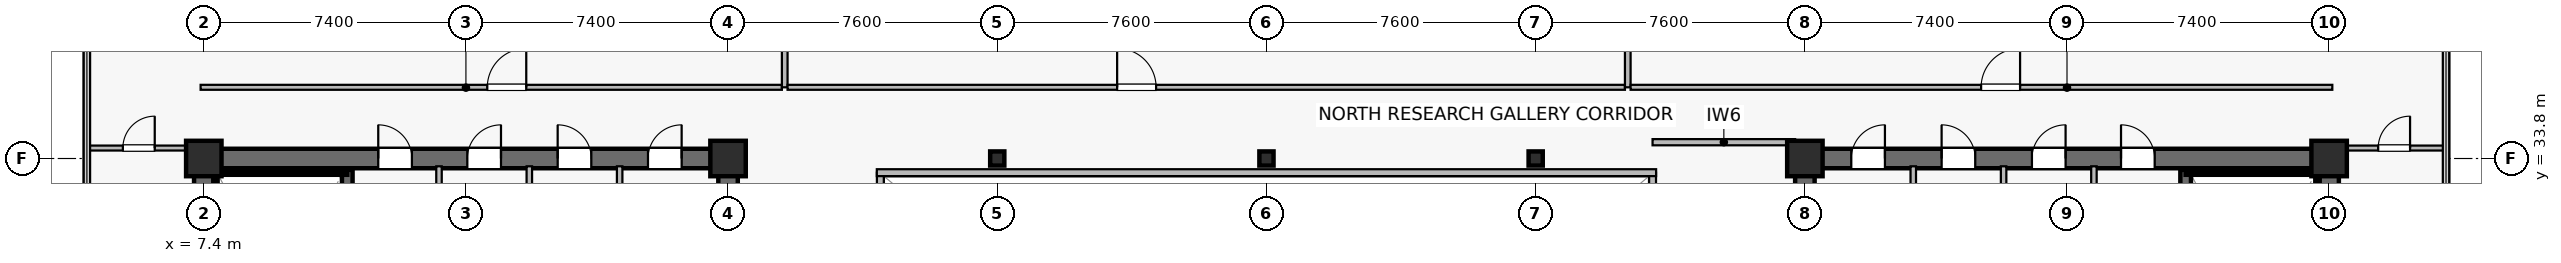
"""IFC4 building model, lengths in metres.
Left out: names, types, materials, properties, quantities, classifications, styles, units other than length and angle.
Written with IfcOpenShell. Run it as: python <this file> out.ifc"""

import sys

from ifc_helpers import new_model, si_unit, direction, frame, frame_2d, origin, origin_2d, place, context, subcontext, project, spatial, rectangle, hollow_rectangle, extrude, source, transform, mapped, element, fill, save


model = new_model("IFC4")
c1 = context("Model", 3, precision=1e-05, world=origin(), true_north=direction((0.0, 1.0)))
c2 = subcontext(c1, "Body", "Model", "MODEL_VIEW")
j1 = project(units=[si_unit("LENGTHUNIT", "METRE"), si_unit("PLANEANGLEUNIT", "RADIAN")], contexts=[c1])
p1 = place(None, origin())
s1 = spatial("IfcSite", under=j1, at=p1, CompositionType="ELEMENT")
p2 = place(p1, origin())
s2 = spatial("IfcBuilding", under=s1, at=p2, CompositionType="ELEMENT")
p3 = place(p2, frame((0.0, 0.0, 209.6)))
s3 = spatial("IfcBuildingStorey", under=s2, at=p3, CompositionType="ELEMENT", Elevation=209.6)
p4 = place(p3, frame((7.125, 33.8, 0.0), z_axis=(0.0, 0.0, 1.0), x_axis=(1.0, 0.0, 0.0)))
e1 = element("IfcWall", 1, at=p4, inside=s3, PredefinedType="SHEAR", context=c2, shape_type="SweptSolid", body=[
    extrude(rectangle(XDim=15.35, YDim=0.55, at=frame_2d((7.675, 0.0))), origin(), (0.0, 0.0, 1.0), 3.8),
])
p5 = place(p4, frame((5.2, 0.0, 0.0)))
e2 = element("IfcOpeningElement", 2, at=p5, cuts=e1, PredefinedType="OPENING", context=c2, shape_type="SweptSolid", body=[
    extrude(rectangle(XDim=0.95, YDim=2.15, at=frame_2d((0.475, 1.075))), frame((0.0, 0.285, 0.0), z_axis=(0.0, -1.0, 0.0), x_axis=(1.0, 0.0, 0.0)), (0.0, 0.0, 1.0), 0.57),
])
p6 = place(p4, frame((7.715, 0.0, 0.0)))
e3 = element("IfcOpeningElement", 3, at=p6, cuts=e1, PredefinedType="OPENING", context=c2, shape_type="SweptSolid", body=[
    extrude(rectangle(XDim=0.95, YDim=2.15, at=frame_2d((0.475, 1.075))), frame((0.0, 0.285, 0.0), z_axis=(0.0, -1.0, 0.0), x_axis=(1.0, 0.0, 0.0)), (0.0, 0.0, 1.0), 0.57),
])
p7 = place(p4, frame((10.265, 0.0, 0.0)))
e4 = element("IfcOpeningElement", 4, at=p7, cuts=e1, PredefinedType="OPENING", context=c2, shape_type="SweptSolid", body=[
    extrude(rectangle(XDim=0.95, YDim=2.15, at=frame_2d((0.475, 1.075))), frame((0.0, 0.285, 0.0), z_axis=(0.0, -1.0, 0.0), x_axis=(1.0, 0.0, 0.0)), (0.0, 0.0, 1.0), 0.57),
])
p8 = place(p4, frame((12.815, 0.0, 0.0)))
e5 = element("IfcOpeningElement", 5, at=p8, cuts=e1, PredefinedType="OPENING", context=c2, shape_type="SweptSolid", body=[
    extrude(rectangle(XDim=0.95, YDim=2.15, at=frame_2d((0.475, 1.075))), frame((0.0, 0.285, 0.0), z_axis=(0.0, -1.0, 0.0), x_axis=(1.0, 0.0, 0.0)), (0.0, 0.0, 1.0), 0.57),
])
p9 = place(p3, frame((7.4, 15.075, 0.0), z_axis=(0.0, 0.0, 1.0), x_axis=(0.0, 1.0, 0.0)))
e6 = element("IfcWall", 6, at=p9, inside=s3, PredefinedType="SHEAR", context=c2, shape_type="SweptSolid", body=[
    extrude(rectangle(XDim=18.45, YDim=0.55, at=frame_2d((9.225, 0.0))), origin(), (0.0, 0.0, 1.0), 3.8),
])
p10 = place(p3, frame((22.2, 15.075, 0.0), z_axis=(0.0, 0.0, 1.0), x_axis=(0.0, 1.0, 0.0)))
e7 = element("IfcWall", 7, at=p10, inside=s3, PredefinedType="SHEAR", context=c2, shape_type="SweptSolid", body=[
    extrude(rectangle(XDim=18.45, YDim=0.55, at=frame_2d((9.225, 0.0))), origin(), (0.0, 0.0, 1.0), 3.8),
])
p11 = place(p10, frame((3.475, 0.0, 0.0)))
e8 = element("IfcOpeningElement", 8, at=p11, cuts=e7, PredefinedType="OPENING", context=c2, shape_type="SweptSolid", body=[
    extrude(rectangle(XDim=1.42, YDim=2.2, at=frame_2d((0.71, 1.1))), frame((0.0, 0.285, 0.0), z_axis=(0.0, -1.0, 0.0), x_axis=(1.0, 0.0, 0.0)), (0.0, 0.0, 1.0), 0.57),
])
p12 = place(p3, frame((11.45, 24.85, 0.0), z_axis=(0.0, 0.0, 1.0), x_axis=(0.0, 1.0, 0.0)))
e9 = element("IfcWall", 9, at=p12, inside=s3, PredefinedType="SHEAR", context=c2, shape_type="SweptSolid", body=[
    extrude(rectangle(XDim=8.63, YDim=0.3, at=frame_2d((4.315, 0.0))), origin(), (0.0, 0.0, 1.0), 3.8),
])
p13 = place(p12, frame((0.42, 0.0, 0.0)))
e10 = element("IfcOpeningElement", 10, at=p13, cuts=e9, PredefinedType="OPENING", context=c2, shape_type="SweptSolid", body=[
    extrude(rectangle(XDim=1.1, YDim=2.15, at=frame_2d((0.55, 1.075))), frame((0.0, 0.16, 0.0), z_axis=(0.0, -1.0, 0.0), x_axis=(1.0, 0.0, 0.0)), (0.0, 0.0, 1.0), 0.32),
])
p14 = place(p3, frame((7.73, 33.4, 0.0), z_axis=(0.0, 0.0, 1.0), x_axis=(1.0, 0.0, 0.0)))
e11 = element("IfcWall", 11, at=p14, inside=s3, PredefinedType="SOLIDWALL", context=c2, shape_type="SweptSolid", body=[
    extrude(rectangle(XDim=3.72, YDim=0.12, at=frame_2d((1.86, 0.0))), origin(), (0.0, 0.0, 1.0), 3.8),
])
p15 = place(p3, frame((7.73, 25.0, 0.0), z_axis=(0.0, 0.0, 1.0), x_axis=(0.0, 1.0, 0.0)))
e12 = element("IfcWall", 12, at=p15, inside=s3, PredefinedType="SOLIDWALL", context=c2, shape_type="SweptSolid", body=[
    extrude(rectangle(XDim=8.32, YDim=0.12, at=frame_2d((4.16, 0.0))), origin(), (0.0, 0.0, 1.0), 3.8),
])
p16 = place(p3, frame((52.325, 33.8, 0.0), z_axis=(0.0, 0.0, 1.0), x_axis=(1.0, 0.0, 0.0)))
e13 = element("IfcWall", 13, at=p16, inside=s3, PredefinedType="SHEAR", context=c2, shape_type="SweptSolid", body=[
    extrude(rectangle(XDim=15.35, YDim=0.55, at=frame_2d((7.675, 0.0))), origin(), (0.0, 0.0, 1.0), 3.8),
])
p17 = place(p16, frame((9.2, 0.0, 0.0)))
e14 = element("IfcOpeningElement", 14, at=p17, cuts=e13, PredefinedType="OPENING", context=c2, shape_type="SweptSolid", body=[
    extrude(rectangle(XDim=0.95, YDim=2.15, at=frame_2d((0.475, 1.075))), frame((0.0, 0.285, 0.0), z_axis=(0.0, -1.0, 0.0), x_axis=(1.0, 0.0, 0.0)), (0.0, 0.0, 1.0), 0.57),
])
p18 = place(p16, frame((6.685, 0.0, 0.0)))
e15 = element("IfcOpeningElement", 15, at=p18, cuts=e13, PredefinedType="OPENING", context=c2, shape_type="SweptSolid", body=[
    extrude(rectangle(XDim=0.95, YDim=2.15, at=frame_2d((0.475, 1.075))), frame((0.0, 0.285, 0.0), z_axis=(0.0, -1.0, 0.0), x_axis=(1.0, 0.0, 0.0)), (0.0, 0.0, 1.0), 0.57),
])
p19 = place(p16, frame((4.135, 0.0, 0.0)))
e16 = element("IfcOpeningElement", 16, at=p19, cuts=e13, PredefinedType="OPENING", context=c2, shape_type="SweptSolid", body=[
    extrude(rectangle(XDim=0.95, YDim=2.15, at=frame_2d((0.475, 1.075))), frame((0.0, 0.285, 0.0), z_axis=(0.0, -1.0, 0.0), x_axis=(1.0, 0.0, 0.0)), (0.0, 0.0, 1.0), 0.57),
])
p20 = place(p16, frame((1.585, 0.0, 0.0)))
e17 = element("IfcOpeningElement", 17, at=p20, cuts=e13, PredefinedType="OPENING", context=c2, shape_type="SweptSolid", body=[
    extrude(rectangle(XDim=0.95, YDim=2.15, at=frame_2d((0.475, 1.075))), frame((0.0, 0.285, 0.0), z_axis=(0.0, -1.0, 0.0), x_axis=(1.0, 0.0, 0.0)), (0.0, 0.0, 1.0), 0.57),
])
p21 = place(p3, frame((52.6, 15.075, 0.0), z_axis=(0.0, 0.0, 1.0), x_axis=(0.0, 1.0, 0.0)))
e18 = element("IfcWall", 18, at=p21, inside=s3, PredefinedType="SHEAR", context=c2, shape_type="SweptSolid", body=[
    extrude(rectangle(XDim=18.45, YDim=0.55, at=frame_2d((9.225, 0.0))), origin(), (0.0, 0.0, 1.0), 3.8),
])
p22 = place(p21, frame((3.475, 0.0, 0.0)))
e19 = element("IfcOpeningElement", 19, at=p22, cuts=e18, PredefinedType="OPENING", context=c2, shape_type="SweptSolid", body=[
    extrude(rectangle(XDim=1.42, YDim=2.2, at=frame_2d((0.71, 1.1))), frame((0.0, 0.285, 0.0), z_axis=(0.0, -1.0, 0.0), x_axis=(1.0, 0.0, 0.0)), (0.0, 0.0, 1.0), 0.57),
])
p23 = place(p3, frame((67.4, 15.075, 0.0), z_axis=(0.0, 0.0, 1.0), x_axis=(0.0, 1.0, 0.0)))
e20 = element("IfcWall", 20, at=p23, inside=s3, PredefinedType="SHEAR", context=c2, shape_type="SweptSolid", body=[
    extrude(rectangle(XDim=18.45, YDim=0.55, at=frame_2d((9.225, 0.0))), origin(), (0.0, 0.0, 1.0), 3.8),
])
p24 = place(p3, frame((63.35, 24.85, 0.0), z_axis=(0.0, 0.0, 1.0), x_axis=(0.0, 1.0, 0.0)))
e21 = element("IfcWall", 21, at=p24, inside=s3, PredefinedType="SHEAR", context=c2, shape_type="SweptSolid", body=[
    extrude(rectangle(XDim=8.63, YDim=0.3, at=frame_2d((4.315, 0.0))), origin(), (0.0, 0.0, 1.0), 3.8),
])
p25 = place(p24, frame((0.42, 0.0, 0.0)))
e22 = element("IfcOpeningElement", 22, at=p25, cuts=e21, PredefinedType="OPENING", context=c2, shape_type="SweptSolid", body=[
    extrude(rectangle(XDim=1.1, YDim=2.15, at=frame_2d((0.55, 1.075))), frame((0.0, 0.16, 0.0), z_axis=(0.0, -1.0, 0.0), x_axis=(1.0, 0.0, 0.0)), (0.0, 0.0, 1.0), 0.32),
])
p26 = place(p3, frame((63.35, 33.4, 0.0), z_axis=(0.0, 0.0, 1.0), x_axis=(1.0, 0.0, 0.0)))
e23 = element("IfcWall", 23, at=p26, inside=s3, PredefinedType="SOLIDWALL", context=c2, shape_type="SweptSolid", body=[
    extrude(rectangle(XDim=3.72, YDim=0.12, at=frame_2d((1.86, 0.0))), origin(), (0.0, 0.0, 1.0), 3.8),
])
p27 = place(p3, frame((67.07, 25.0, 0.0), z_axis=(0.0, 0.0, 1.0), x_axis=(0.0, 1.0, 0.0)))
e24 = element("IfcWall", 24, at=p27, inside=s3, PredefinedType="SOLIDWALL", context=c2, shape_type="SweptSolid", body=[
    extrude(rectangle(XDim=8.32, YDim=0.12, at=frame_2d((4.16, 0.0))), origin(), (0.0, 0.0, 1.0), 3.8),
])
m1 = source(origin(), c2, "Body", "SweptSolid", [
    extrude(rectangle(XDim=1.0, YDim=1.0, at=origin_2d()), origin(), (0.0, 0.0, 1.0), 4.1),
])
for number, where, z_axis, x_axis in (
    (25, (7.4, 33.8, 0.0), (0.0, 0.0, 1.0), (1.0, 0.0, 0.0)),
    (26, (22.2, 33.8, 0.0), (0.0, 0.0, 1.0), (1.0, 0.0, 0.0)),
    (27, (52.6, 33.8, 0.0), (0.0, 0.0, 1.0), (1.0, 0.0, 0.0)),
    (28, (67.4, 33.8, 0.0), (0.0, 0.0, 1.0), (1.0, 0.0, 0.0)),
):
    element("IfcColumn", number, at=place(p3, frame(where, z_axis=z_axis, x_axis=x_axis)), inside=s3, PredefinedType="COLUMN", context=c2, shape_type="MappedRepresentation", body=[
        mapped(m1, transform((0.0, 0.0, 0.0), scale=1.0)),
    ])
m2 = source(origin(), c2, "Body", "SweptSolid", [
    extrude(hollow_rectangle(XDim=0.4, YDim=0.4, WallThickness=0.019, at=origin_2d()), origin(), (0.0, 0.0, 1.0), 4.1),
])
for number, where, z_axis, x_axis in (
    (29, (29.8, 33.8, 0.0), (0.0, 0.0, 1.0), (1.0, 0.0, 0.0)),
    (30, (37.4, 33.8, 0.0), (0.0, 0.0, 1.0), (1.0, 0.0, 0.0)),
    (31, (45.0, 33.8, 0.0), (0.0, 0.0, 1.0), (1.0, 0.0, 0.0)),
):
    element("IfcColumn", number, at=place(p3, frame(where, z_axis=z_axis, x_axis=x_axis)), inside=s3, PredefinedType="COLUMN", context=c2, shape_type="MappedRepresentation", body=[
        mapped(m2, transform((0.0, 0.0, 0.0), scale=1.0)),
    ])
for number, where, z_axis, x_axis in (
    (32, (14.04, 29.65, 0.0), (0.0, 0.0, 1.0), (0.0, 1.0, 0.0)),
    (33, (16.59, 29.65, 0.0), (0.0, 0.0, 1.0), (0.0, 1.0, 0.0)),
    (34, (19.14, 29.65, 0.0), (0.0, 0.0, 1.0), (0.0, 1.0, 0.0)),
    (35, (60.76, 29.65, 0.0), (0.0, 0.0, 1.0), (0.0, 1.0, 0.0)),
    (36, (58.21, 29.65, 0.0), (0.0, 0.0, 1.0), (0.0, 1.0, 0.0)),
    (37, (55.66, 29.65, 0.0), (0.0, 0.0, 1.0), (0.0, 1.0, 0.0)),
):
    element("IfcWall", number, at=place(p3, frame(where, z_axis=z_axis, x_axis=x_axis)), inside=s3, PredefinedType="PLUMBINGWALL", context=c2, shape_type="SweptSolid", body=[
        extrude(rectangle(XDim=3.93, YDim=0.155, at=frame_2d((1.965, 0.0))), origin(), (0.0, 0.0, 1.0), 3.8),
    ])
p28 = place(p3, frame((48.3, 34.26, 0.0), z_axis=(0.0, 0.0, 1.0), x_axis=(1.0, 0.0, 0.0)))
e38 = element("IfcWall", 38, at=p28, inside=s3, PredefinedType="PARTITIONING", context=c2, shape_type="SweptSolid", body=[
    extrude(rectangle(XDim=4.025, YDim=0.175, at=frame_2d((2.012, 0.0))), origin(), (0.0, 0.0, 1.0), 3.485),
])
p29 = place(p3, frame((26.5, 15.2, 0.0), z_axis=(0.0, 0.0, 1.0), x_axis=(0.0, 1.0, 0.0)))
e39 = element("IfcWall", 39, at=p29, inside=s3, PredefinedType="SOLIDWALL", context=c2, shape_type="SweptSolid", body=[
    extrude(rectangle(XDim=18.2, YDim=0.195, at=frame_2d((9.1, 0.0))), origin(), (0.0, 0.0, 1.0), 3.8),
])
p30 = place(p29, frame((1.8, 0.0, 0.9)))
e40 = element("IfcOpeningElement", 40, at=p30, cuts=e39, PredefinedType="OPENING", context=c2, shape_type="SweptSolid", body=[
    extrude(rectangle(XDim=1.5, YDim=1.4, at=frame_2d((0.75, 0.7))), frame((0.0, 0.107, 0.0), z_axis=(0.0, -1.0, 0.0), x_axis=(1.0, 0.0, 0.0)), (0.0, 0.0, 1.0), 0.215),
])
p31 = place(p29, frame((13.2, 0.0, 0.9)))
e41 = element("IfcOpeningElement", 41, at=p31, cuts=e39, PredefinedType="OPENING", context=c2, shape_type="SweptSolid", body=[
    extrude(rectangle(XDim=1.5, YDim=1.4, at=frame_2d((0.75, 0.7))), frame((0.0, 0.107, 0.0), z_axis=(0.0, -1.0, 0.0), x_axis=(1.0, 0.0, 0.0)), (0.0, 0.0, 1.0), 0.215),
])
p32 = place(p3, frame((48.3, 15.2, 0.0), z_axis=(0.0, 0.0, 1.0), x_axis=(0.0, 1.0, 0.0)))
e42 = element("IfcWall", 42, at=p32, inside=s3, PredefinedType="SOLIDWALL", context=c2, shape_type="SweptSolid", body=[
    extrude(rectangle(XDim=18.2, YDim=0.195, at=frame_2d((9.1, 0.0))), origin(), (0.0, 0.0, 1.0), 3.8),
])
p33 = place(p32, frame((1.8, 0.0, 0.9)))
e43 = element("IfcOpeningElement", 43, at=p33, cuts=e42, PredefinedType="OPENING", context=c2, shape_type="SweptSolid", body=[
    extrude(rectangle(XDim=1.5, YDim=1.4, at=frame_2d((0.75, 0.7))), frame((0.0, 0.107, 0.0), z_axis=(0.0, -1.0, 0.0), x_axis=(1.0, 0.0, 0.0)), (0.0, 0.0, 1.0), 0.215),
])
p34 = place(p32, frame((13.2, 0.0, 0.9)))
e44 = element("IfcOpeningElement", 44, at=p34, cuts=e42, PredefinedType="OPENING", context=c2, shape_type="SweptSolid", body=[
    extrude(rectangle(XDim=1.5, YDim=1.4, at=frame_2d((0.75, 0.7))), frame((0.0, 0.107, 0.0), z_axis=(0.0, -1.0, 0.0), x_axis=(1.0, 0.0, 0.0)), (0.0, 0.0, 1.0), 0.215),
])
p35 = place(p3, frame((26.4, 33.4, 0.0), z_axis=(0.0, 0.0, 1.0), x_axis=(1.0, 0.0, 0.0)))
e45 = element("IfcWall", 45, at=p35, inside=s3, PredefinedType="SOLIDWALL", context=c2, shape_type="SweptSolid", body=[
    extrude(rectangle(XDim=22.0, YDim=0.195, at=frame_2d((11.0, 0.0))), origin(), (0.0, 0.0, 1.0), 3.8),
])
p36 = place(p3, frame((7.31, 35.81, 0.0), z_axis=(0.0, 0.0, 1.0), x_axis=(1.0, 0.0, 0.0)))
e46 = element("IfcWall", 46, at=p36, inside=s3, PredefinedType="PARTITIONING", context=c2, shape_type="SweptSolid", body=[
    extrude(rectangle(XDim=16.41, YDim=0.14, at=frame_2d((8.205, 0.0))), origin(), (0.0, 0.0, 1.0), 3.197),
])
p37 = place(p36, frame((8.093, 0.0, 0.0)))
e47 = element("IfcOpeningElement", 47, at=p37, cuts=e46, PredefinedType="OPENING", context=c2, shape_type="SweptSolid", body=[
    extrude(rectangle(XDim=1.1, YDim=2.18, at=frame_2d((0.55, 1.09))), frame((0.0, 0.08, 0.0), z_axis=(0.0, -1.0, 0.0), x_axis=(1.0, 0.0, 0.0)), (0.0, 0.0, 1.0), 0.16),
])
p38 = place(p3, frame((23.8, 35.81, 0.0), z_axis=(0.0, 0.0, 1.0), x_axis=(0.0, 1.0, 0.0)))
e48 = element("IfcWall", 48, at=p38, inside=s3, PredefinedType="PARTITIONING", context=c2, shape_type="SweptSolid", body=[
    extrude(rectangle(XDim=10.08, YDim=0.16, at=frame_2d((5.04, 0.0))), origin(), (0.0, 0.0, 1.0), 3.135),
])
p39 = place(p3, frame((23.88, 35.81, 0.0), z_axis=(0.0, 0.0, 1.0), x_axis=(1.0, 0.0, 0.0)))
e49 = element("IfcWall", 49, at=p39, inside=s3, PredefinedType="PARTITIONING", context=c2, shape_type="SweptSolid", body=[
    extrude(rectangle(XDim=23.64, YDim=0.14, at=frame_2d((11.82, 0.0))), origin(), (0.0, 0.0, 1.0), 3.197),
])
p40 = place(p39, frame((9.304, 0.0, 0.0)))
e50 = element("IfcOpeningElement", 50, at=p40, cuts=e49, PredefinedType="OPENING", context=c2, shape_type="SweptSolid", body=[
    extrude(rectangle(XDim=1.1, YDim=2.18, at=frame_2d((0.55, 1.09))), frame((0.0, 0.08, 0.0), z_axis=(0.0, -1.0, 0.0), x_axis=(1.0, 0.0, 0.0)), (0.0, 0.0, 1.0), 0.16),
])
p41 = place(p3, frame((47.6, 35.81, 0.0), z_axis=(0.0, 0.0, 1.0), x_axis=(0.0, 1.0, 0.0)))
e51 = element("IfcWall", 51, at=p41, inside=s3, PredefinedType="PARTITIONING", context=c2, shape_type="SweptSolid", body=[
    extrude(rectangle(XDim=8.88, YDim=0.16, at=frame_2d((4.44, 0.0))), origin(), (0.0, 0.0, 1.0), 3.135),
])
p42 = place(p3, frame((47.68, 35.81, 0.0), z_axis=(0.0, 0.0, 1.0), x_axis=(1.0, 0.0, 0.0)))
e52 = element("IfcWall", 52, at=p42, inside=s3, PredefinedType="PARTITIONING", context=c2, shape_type="SweptSolid", body=[
    extrude(rectangle(XDim=19.81, YDim=0.14, at=frame_2d((9.905, 0.0))), origin(), (0.0, 0.0, 1.0), 3.197),
])
p43 = place(p42, frame((9.895, 0.0, 0.0)))
e53 = element("IfcOpeningElement", 53, at=p43, cuts=e52, PredefinedType="OPENING", context=c2, shape_type="SweptSolid", body=[
    extrude(rectangle(XDim=1.1, YDim=2.18, at=frame_2d((0.55, 1.09))), frame((0.0, 0.08, 0.0), z_axis=(0.0, -1.0, 0.0), x_axis=(1.0, 0.0, 0.0)), (0.0, 0.0, 1.0), 0.16),
])
p44 = place(p3, frame((4.11, 34.095, 0.0), z_axis=(0.0, 0.0, 1.0), x_axis=(1.0, 0.0, 0.0)))
e54 = element("IfcWall", 54, at=p44, inside=s3, PredefinedType="PARTITIONING", context=c2, shape_type="SweptSolid", body=[
    extrude(rectangle(XDim=2.91, YDim=0.14, at=frame_2d((1.455, 0.0))), origin(), (0.0, 0.0, 1.0), 3.8),
])
p45 = place(p44, frame((1.005, 0.0, 0.0)))
e55 = element("IfcOpeningElement", 55, at=p45, cuts=e54, PredefinedType="OPENING", context=c2, shape_type="SweptSolid", body=[
    extrude(rectangle(XDim=0.9, YDim=2.1, at=frame_2d((0.45, 1.05))), frame((0.0, 0.08, 0.0), z_axis=(0.0, -1.0, 0.0), x_axis=(1.0, 0.0, 0.0)), (0.0, 0.0, 1.0), 0.16),
])
p46 = place(p3, frame((67.78, 34.095, 0.0), z_axis=(0.0, 0.0, 1.0), x_axis=(1.0, 0.0, 0.0)))
e56 = element("IfcWall", 56, at=p46, inside=s3, PredefinedType="PARTITIONING", context=c2, shape_type="SweptSolid", body=[
    extrude(rectangle(XDim=2.91, YDim=0.14, at=frame_2d((1.455, 0.0))), origin(), (0.0, 0.0, 1.0), 3.8),
])
p47 = place(p46, frame((1.005, 0.0, 0.0)))
e57 = element("IfcOpeningElement", 57, at=p47, cuts=e56, PredefinedType="OPENING", context=c2, shape_type="SweptSolid", body=[
    extrude(rectangle(XDim=0.9, YDim=2.1, at=frame_2d((0.45, 1.05))), frame((0.0, 0.08, 0.0), z_axis=(0.0, -1.0, 0.0), x_axis=(1.0, 0.0, 0.0)), (0.0, 0.0, 1.0), 0.16),
])
m3 = source(origin(), c2, "Body", "SweptSolid", [
    extrude(rectangle(XDim=0.95, YDim=2.15, at=frame_2d((0.475, 1.075))), frame((0.0, 0.025, 0.0), z_axis=(0.0, -1.0, 0.0), x_axis=(1.0, 0.0, 0.0)), (0.0, 0.0, 1.0), 0.05),
])
p48 = place(p5, origin())
e58 = element("IfcDoor", 58, at=p48, inside=s3, OperationType="SINGLE_SWING_LEFT", PredefinedType="DOOR", context=c2, shape_type="MappedRepresentation", body=[
    mapped(m3, transform((0.0, 0.0, 0.0), scale=1.0)),
])
fill(e2, e58)
p49 = place(p6, origin())
e59 = element("IfcDoor", 59, at=p49, inside=s3, OperationType="SINGLE_SWING_RIGHT", PredefinedType="DOOR", context=c2, shape_type="MappedRepresentation", body=[
    mapped(m3, transform((0.0, 0.0, 0.0), scale=1.0)),
])
fill(e3, e59)
p50 = place(p7, origin())
e60 = element("IfcDoor", 60, at=p50, inside=s3, OperationType="SINGLE_SWING_LEFT", PredefinedType="DOOR", context=c2, shape_type="MappedRepresentation", body=[
    mapped(m3, transform((0.0, 0.0, 0.0), scale=1.0)),
])
fill(e4, e60)
p51 = place(p8, origin())
e61 = element("IfcDoor", 61, at=p51, inside=s3, OperationType="SINGLE_SWING_RIGHT", PredefinedType="DOOR", context=c2, shape_type="MappedRepresentation", body=[
    mapped(m3, transform((0.0, 0.0, 0.0), scale=1.0)),
])
fill(e5, e61)
p52 = place(p17, origin())
e62 = element("IfcDoor", 62, at=p52, inside=s3, OperationType="SINGLE_SWING_LEFT", PredefinedType="DOOR", context=c2, shape_type="MappedRepresentation", body=[
    mapped(m3, transform((0.0, 0.0, 0.0), scale=1.0)),
])
fill(e14, e62)
p53 = place(p18, origin())
e63 = element("IfcDoor", 63, at=p53, inside=s3, OperationType="SINGLE_SWING_RIGHT", PredefinedType="DOOR", context=c2, shape_type="MappedRepresentation", body=[
    mapped(m3, transform((0.0, 0.0, 0.0), scale=1.0)),
])
fill(e15, e63)
p54 = place(p19, origin())
e64 = element("IfcDoor", 64, at=p54, inside=s3, OperationType="SINGLE_SWING_LEFT", PredefinedType="DOOR", context=c2, shape_type="MappedRepresentation", body=[
    mapped(m3, transform((0.0, 0.0, 0.0), scale=1.0)),
])
fill(e16, e64)
p55 = place(p20, origin())
e65 = element("IfcDoor", 65, at=p55, inside=s3, OperationType="SINGLE_SWING_RIGHT", PredefinedType="DOOR", context=c2, shape_type="MappedRepresentation", body=[
    mapped(m3, transform((0.0, 0.0, 0.0), scale=1.0)),
])
fill(e17, e65)
m4 = source(origin(), c2, "Body", "SweptSolid", [
    extrude(rectangle(XDim=1.1, YDim=2.18, at=frame_2d((0.55, 1.09))), frame((0.0, 0.025, 0.0), z_axis=(0.0, -1.0, 0.0), x_axis=(1.0, 0.0, 0.0)), (0.0, 0.0, 1.0), 0.05),
])
p56 = place(p37, origin())
e66 = element("IfcDoor", 66, at=p56, inside=s3, OperationType="SINGLE_SWING_RIGHT", PredefinedType="DOOR", context=c2, shape_type="MappedRepresentation", body=[
    mapped(m4, transform((0.0, 0.0, 0.0), scale=1.0)),
])
fill(e47, e66)
p57 = place(p40, origin())
e67 = element("IfcDoor", 67, at=p57, inside=s3, OperationType="SINGLE_SWING_LEFT", PredefinedType="DOOR", context=c2, shape_type="MappedRepresentation", body=[
    mapped(m4, transform((0.0, 0.0, 0.0), scale=1.0)),
])
fill(e50, e67)
p58 = place(p43, origin())
e68 = element("IfcDoor", 68, at=p58, inside=s3, OperationType="SINGLE_SWING_RIGHT", PredefinedType="DOOR", context=c2, shape_type="MappedRepresentation", body=[
    mapped(m4, transform((0.0, 0.0, 0.0), scale=1.0)),
])
fill(e53, e68)
m5 = source(origin(), c2, "Body", "SweptSolid", [
    extrude(rectangle(XDim=0.9, YDim=2.1, at=frame_2d((0.45, 1.05))), frame((0.0, 0.025, 0.0), z_axis=(0.0, -1.0, 0.0), x_axis=(1.0, 0.0, 0.0)), (0.0, 0.0, 1.0), 0.05),
])
p59 = place(p45, origin())
e69 = element("IfcDoor", 69, at=p59, inside=s3, OperationType="SINGLE_SWING_RIGHT", PredefinedType="DOOR", context=c2, shape_type="MappedRepresentation", body=[
    mapped(m5, transform((0.0, 0.0, 0.0), scale=1.0)),
])
fill(e55, e69)
p60 = place(p47, origin())
e70 = element("IfcDoor", 70, at=p60, inside=s3, OperationType="SINGLE_SWING_RIGHT", PredefinedType="DOOR", context=c2, shape_type="MappedRepresentation", body=[
    mapped(m5, transform((0.0, 0.0, 0.0), scale=1.0)),
])
fill(e57, e70)
save(model, sys.argv[1])
